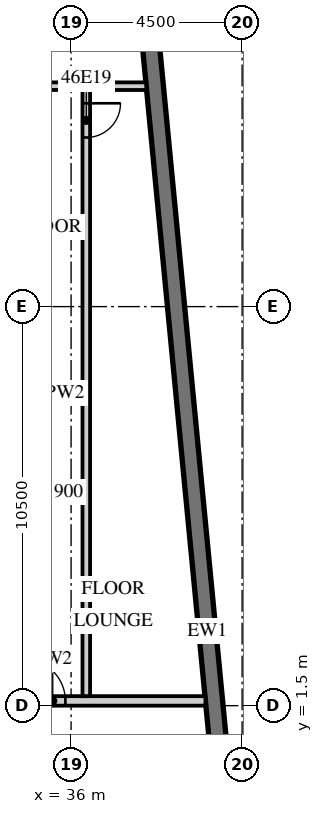
"""IFC4 building model, lengths in metres.
Left out: names, types, materials, properties, quantities, classifications, styles, units other than length and angle.
Written with IfcOpenShell. Run it as: python <this file> out.ifc"""

import sys

from ifc_helpers import new_model, si_unit, direction, frame, frame_2d, origin, place, context, subcontext, project, spatial, rectangle, extrude, element, fill, save


model = new_model("IFC4")
c1 = context("Model", 3, precision=1e-05, world=origin(), true_north=direction((0.0, 1.0)))
c2 = subcontext(c1, "Body", "Model", "MODEL_VIEW")
j1 = project(units=[si_unit("LENGTHUNIT", "METRE"), si_unit("PLANEANGLEUNIT", "RADIAN")], contexts=[c1])
p1 = place(None, origin())
s1 = spatial("IfcSite", under=j1, at=p1, CompositionType="ELEMENT")
p2 = place(p1, origin())
s2 = spatial("IfcBuilding", under=s1, at=p2, CompositionType="ELEMENT")
p3 = place(p2, frame((0.0, 0.0, 193.3)))
s3 = spatial("IfcBuildingStorey", under=s2, at=p3, CompositionType="ELEMENT", Elevation=193.3)
p4 = place(p3, frame((41.214, -13.466, 0.0), z_axis=(0.0, 0.0, 1.0), x_axis=(-0.095847314626, 0.995396047952, 0.0)))
e1 = element("IfcWall", 1, at=p4, inside=s3, PredefinedType="SOLIDWALL", context=c2, shape_type="SweptSolid", body=[
    extrude(rectangle(XDim=34.0, YDim=0.45, at=frame_2d((17.0, 0.0))), origin(), (0.0, 0.0, 1.0), 3.02),
])
p5 = place(p4, frame((3.869, 0.0, 0.45)))
e2 = element("IfcOpeningElement", 2, at=p5, cuts=e1, PredefinedType="OPENING", context=c2, shape_type="SweptSolid", body=[
    extrude(rectangle(XDim=3.3, YDim=2.25, at=frame_2d((1.65, 1.125))), frame((0.0, 0.235, 0.0), z_axis=(0.0, -1.0, 0.0), x_axis=(1.0, 0.0, 0.0)), (0.0, 0.0, 1.0), 0.47),
])
p6 = place(p4, frame((8.39, 0.0, 0.45)))
e3 = element("IfcOpeningElement", 3, at=p6, cuts=e1, PredefinedType="OPENING", context=c2, shape_type="SweptSolid", body=[
    extrude(rectangle(XDim=3.3, YDim=2.25, at=frame_2d((1.65, 1.125))), frame((0.0, 0.235, 0.0), z_axis=(0.0, -1.0, 0.0), x_axis=(1.0, 0.0, 0.0)), (0.0, 0.0, 1.0), 0.47),
])
p7 = place(p3, frame((31.5, 1.625, 0.0), z_axis=(0.0, 0.0, 1.0), x_axis=(1.0, 0.0, 0.0)))
e4 = element("IfcWall", 4, at=p7, inside=s3, PredefinedType="PARTITIONING", context=c2, shape_type="SweptSolid", body=[
    extrude(rectangle(XDim=8.035, YDim=0.25, at=frame_2d((4.018, 0.0))), origin(), (0.0, 0.0, 1.0), 3.02),
])
p8 = place(p7, frame((0.625, 0.0, 0.0)))
e5 = element("IfcOpeningElement", 5, at=p8, cuts=e4, PredefinedType="OPENING", context=c2, shape_type="SweptSolid", body=[
    extrude(rectangle(XDim=1.3, YDim=2.1, at=frame_2d((0.65, 1.05))), frame((0.0, 0.135, 0.0), z_axis=(0.0, -1.0, 0.0), x_axis=(1.0, 0.0, 0.0)), (0.0, 0.0, 1.0), 0.27),
])
p9 = place(p7, frame((3.25, 0.0, 0.0)))
e6 = element("IfcOpeningElement", 6, at=p9, cuts=e4, PredefinedType="OPENING", context=c2, shape_type="SweptSolid", body=[
    extrude(rectangle(XDim=1.1, YDim=2.1, at=frame_2d((0.55, 1.05))), frame((0.0, 0.135, 0.0), z_axis=(0.0, -1.0, 0.0), x_axis=(1.0, 0.0, 0.0)), (0.0, 0.0, 1.0), 0.27),
])
p10 = place(p3, frame((36.4, 1.75, 0.0), z_axis=(0.0, 0.0, 1.0), x_axis=(0.0, 1.0, 0.0)))
e7 = element("IfcWall", 7, at=p10, inside=s3, PredefinedType="PARTITIONING", context=c2, shape_type="SweptSolid", body=[
    extrude(rectangle(XDim=15.95, YDim=0.2, at=frame_2d((7.975, 0.0))), origin(), (0.0, 0.0, 1.0), 3.02),
])
p11 = place(p10, frame((14.7, 0.0, 0.0)))
e8 = element("IfcOpeningElement", 8, at=p11, cuts=e7, PredefinedType="OPENING", context=c2, shape_type="SweptSolid", body=[
    extrude(rectangle(XDim=0.9, YDim=2.1, at=frame_2d((0.45, 1.05))), frame((0.0, 0.11, 0.0), z_axis=(0.0, -1.0, 0.0), x_axis=(1.0, 0.0, 0.0)), (0.0, 0.0, 1.0), 0.22),
])
p12 = place(p3, frame((13.6, 17.8, 0.0), z_axis=(0.0, 0.0, 1.0), x_axis=(1.0, 0.0, 0.0)))
e9 = element("IfcWall", 9, at=p12, inside=s3, PredefinedType="PARTITIONING", context=c2, shape_type="SweptSolid", body=[
    extrude(rectangle(XDim=24.378, YDim=0.2, at=frame_2d((12.189, 0.0))), origin(), (0.0, 0.0, 1.0), 3.02),
])
p13 = place(p12, frame((16.613, 0.0, 0.0)))
e10 = element("IfcOpeningElement", 10, at=p13, cuts=e9, PredefinedType="OPENING", context=c2, shape_type="SweptSolid", body=[
    extrude(rectangle(XDim=0.9, YDim=2.1, at=frame_2d((0.45, 1.05))), frame((0.0, 0.11, 0.0), z_axis=(0.0, -1.0, 0.0), x_axis=(1.0, 0.0, 0.0)), (0.0, 0.0, 1.0), 0.22),
])
p14 = place(p12, frame((8.312, 0.0, 0.0)))
e11 = element("IfcOpeningElement", 11, at=p14, cuts=e9, PredefinedType="OPENING", context=c2, shape_type="SweptSolid", body=[
    extrude(rectangle(XDim=0.9, YDim=2.1, at=frame_2d((0.45, 1.05))), frame((0.0, 0.11, 0.0), z_axis=(0.0, -1.0, 0.0), x_axis=(1.0, 0.0, 0.0)), (0.0, 0.0, 1.0), 0.22),
])
p15 = place(p9, origin())
e12 = element("IfcDoor", 12, at=p15, inside=s3, OperationType="SINGLE_SWING_LEFT", PredefinedType="DOOR", context=c2, shape_type="SweptSolid", body=[
    extrude(rectangle(XDim=1.1, YDim=2.1, at=frame_2d((0.55, 1.05))), frame((0.0, 0.025, 0.0), z_axis=(0.0, -1.0, 0.0), x_axis=(1.0, 0.0, 0.0)), (0.0, 0.0, 1.0), 0.05),
])
fill(e6, e12)
p16 = place(p11, origin())
e13 = element("IfcDoor", 13, at=p16, inside=s3, OperationType="SINGLE_SWING_RIGHT", PredefinedType="DOOR", context=c2, shape_type="SweptSolid", body=[
    extrude(rectangle(XDim=0.9, YDim=2.1, at=frame_2d((0.45, 1.05))), frame((0.0, 0.025, 0.0), z_axis=(0.0, -1.0, 0.0), x_axis=(1.0, 0.0, 0.0)), (0.0, 0.0, 1.0), 0.05),
])
fill(e8, e13)
save(model, sys.argv[1])
